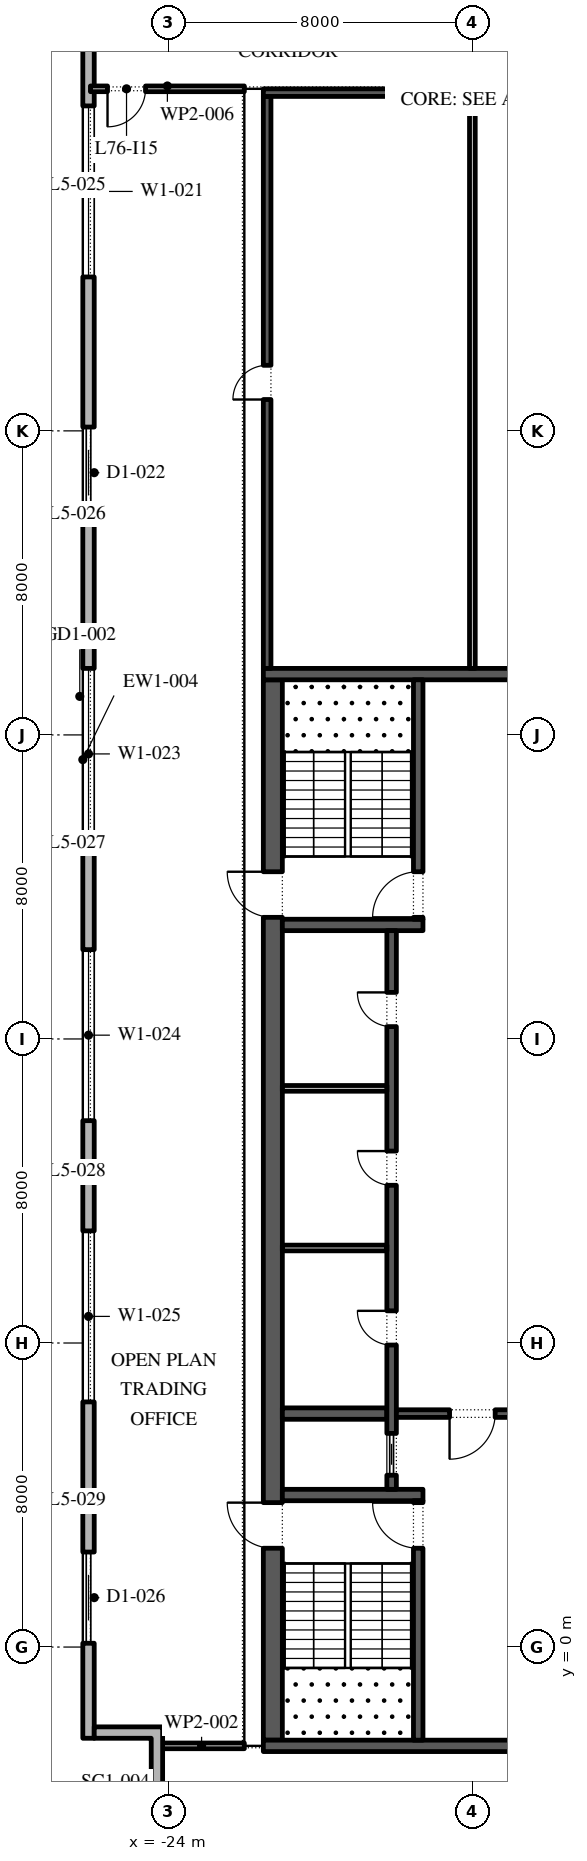
"""IFC4 building model, lengths in metres.
Left out: names, types, materials, properties, quantities, classifications, styles, units other than length and angle.
Written with IfcOpenShell. Run it as: python <this file> out.ifc"""

import sys

from ifc_helpers import new_model, si_unit, direction, frame, frame_2d, origin, place, context, subcontext, project, spatial, polyline, rectangle, outline, extrude, element, fill, save


model = new_model("IFC4")
c1 = context("Model", 3, precision=1e-05, world=origin(), true_north=direction((0.0, 1.0)))
c2 = subcontext(c1, "Body", "Model", "MODEL_VIEW")
j1 = project(units=[si_unit("LENGTHUNIT", "METRE"), si_unit("PLANEANGLEUNIT", "RADIAN")], contexts=[c1])
p1 = place(None, origin())
s1 = spatial("IfcSite", under=j1, at=p1, CompositionType="ELEMENT")
p2 = place(p1, origin())
s2 = spatial("IfcBuilding", under=s1, at=p2, CompositionType="ELEMENT")
p3 = place(p2, frame((0.0, 0.0, 346.8)))
s3 = spatial("IfcBuildingStorey", under=s2, at=p3, CompositionType="ELEMENT", Elevation=346.8)
p4 = place(p3, frame((-26.1, 49.1, 0.0), z_axis=(0.0, 0.0, 1.0), x_axis=(0.0, -1.0, 0.0)))
e1 = element("IfcWall", 1, at=p4, inside=s3, PredefinedType="STANDARD", context=c2, shape_type="SweptSolid", body=[
    extrude(rectangle(XDim=51.5, YDim=0.3, at=frame_2d((25.75, 0.0))), origin(), (0.0, 0.0, 1.0), 4.0),
])
p5 = place(p4, frame((1.3, 0.0, 0.45)))
e2 = element("IfcOpeningElement", 2, at=p5, cuts=e1, PredefinedType="OPENING", context=c2, shape_type="SweptSolid", body=[
    extrude(rectangle(XDim=4.5, YDim=3.05, at=frame_2d((2.25, 1.525))), frame((0.0, 0.16, 0.0), z_axis=(0.0, -1.0, 0.0), x_axis=(1.0, 0.0, 0.0)), (0.0, 0.0, 1.0), 0.32),
])
p6 = place(p4, frame((8.55, 0.0, 0.45)))
e3 = element("IfcOpeningElement", 3, at=p6, cuts=e1, PredefinedType="OPENING", context=c2, shape_type="SweptSolid", body=[
    extrude(rectangle(XDim=4.5, YDim=3.05, at=frame_2d((2.25, 1.525))), frame((0.0, 0.16, 0.0), z_axis=(0.0, -1.0, 0.0), x_axis=(1.0, 0.0, 0.0)), (0.0, 0.0, 1.0), 0.32),
])
p7 = place(p4, frame((17.0, 0.0, 0.0)))
e4 = element("IfcOpeningElement", 4, at=p7, cuts=e1, PredefinedType="OPENING", context=c2, shape_type="SweptSolid", body=[
    extrude(rectangle(XDim=2.4, YDim=3.5, at=frame_2d((1.2, 1.75))), frame((0.0, 0.16, 0.0), z_axis=(0.0, -1.0, 0.0), x_axis=(1.0, 0.0, 0.0)), (0.0, 0.0, 1.0), 0.32),
])
p8 = place(p4, frame((23.35, 0.0, 0.45)))
e5 = element("IfcOpeningElement", 5, at=p8, cuts=e1, PredefinedType="OPENING", context=c2, shape_type="SweptSolid", body=[
    extrude(rectangle(XDim=4.5, YDim=3.05, at=frame_2d((2.25, 1.525))), frame((0.0, 0.16, 0.0), z_axis=(0.0, -1.0, 0.0), x_axis=(1.0, 0.0, 0.0)), (0.0, 0.0, 1.0), 0.32),
])
p9 = place(p4, frame((30.75, 0.0, 0.45)))
e6 = element("IfcOpeningElement", 6, at=p9, cuts=e1, PredefinedType="OPENING", context=c2, shape_type="SweptSolid", body=[
    extrude(rectangle(XDim=4.5, YDim=3.05, at=frame_2d((2.25, 1.525))), frame((0.0, 0.16, 0.0), z_axis=(0.0, -1.0, 0.0), x_axis=(1.0, 0.0, 0.0)), (0.0, 0.0, 1.0), 0.32),
])
p10 = place(p4, frame((38.15, 0.0, 0.45)))
e7 = element("IfcOpeningElement", 7, at=p10, cuts=e1, PredefinedType="OPENING", context=c2, shape_type="SweptSolid", body=[
    extrude(rectangle(XDim=4.5, YDim=3.05, at=frame_2d((2.25, 1.525))), frame((0.0, 0.16, 0.0), z_axis=(0.0, -1.0, 0.0), x_axis=(1.0, 0.0, 0.0)), (0.0, 0.0, 1.0), 0.32),
])
p11 = place(p4, frame((46.6, 0.0, 0.0)))
e8 = element("IfcOpeningElement", 8, at=p11, cuts=e1, PredefinedType="OPENING", context=c2, shape_type="SweptSolid", body=[
    extrude(rectangle(XDim=2.4, YDim=3.5, at=frame_2d((1.2, 1.75))), frame((0.0, 0.16, 0.0), z_axis=(0.0, -1.0, 0.0), x_axis=(1.0, 0.0, 0.0)), (0.0, 0.0, 1.0), 0.32),
])
p12 = place(p3, origin())
e9 = element("IfcWall", 9, at=p12, inside=s3, PredefinedType="STANDARD", context=c2, shape_type="SweptSolid", body=[
    extrude(outline(polyline([(-22.65, -4.2), (-24.45, -4.2), (-24.45, -2.4), (-25.95, -2.4), (-25.95, -2.1), (-24.15, -2.1), (-24.15, -3.9), (-22.35, -3.9), (-22.35, -6.0), (-22.65, -6.0), (-22.65, -4.2)])), origin(), (0.0, 0.0, 1.0), 4.0),
])
p13 = place(p3, frame((-21.25, -2.45, 0.0), z_axis=(0.0, 0.0, 1.0), x_axis=(0.0, 1.0, 0.0)))
e10 = element("IfcWall", 10, at=p13, inside=s3, PredefinedType="SHEAR", context=c2, shape_type="SweptSolid", body=[
    extrude(rectangle(XDim=27.9, YDim=0.5, at=frame_2d((13.95, 0.0))), origin(), (0.0, 0.0, 1.0), 4.0),
])
p14 = place(p13, frame((5.05, 0.0, 0.0)))
e11 = element("IfcOpeningElement", 11, at=p14, cuts=e10, PredefinedType="OPENING", context=c2, shape_type="SweptSolid", body=[
    extrude(rectangle(XDim=1.2, YDim=2.1, at=frame_2d((0.6, 1.05))), frame((0.0, 0.26, 0.0), z_axis=(0.0, -1.0, 0.0), x_axis=(1.0, 0.0, 0.0)), (0.0, 0.0, 1.0), 0.52),
])
p15 = place(p13, frame((21.65, 0.0, 0.0)))
e12 = element("IfcOpeningElement", 12, at=p15, cuts=e10, PredefinedType="OPENING", context=c2, shape_type="SweptSolid", body=[
    extrude(rectangle(XDim=1.2, YDim=2.1, at=frame_2d((0.6, 1.05))), frame((0.0, 0.26, 0.0), z_axis=(0.0, -1.0, 0.0), x_axis=(1.0, 0.0, 0.0)), (0.0, 0.0, 1.0), 0.52),
])
for number, where, z_axis, x_axis in (
    (13, (-21.5, -2.6, 0.0), (0.0, 0.0, 1.0), (1.0, 0.0, 0.0)),
    (14, (-21.5, 25.6, 0.0), (0.0, 0.0, 1.0), (1.0, 0.0, 0.0)),
):
    element("IfcWall", number, at=place(p3, frame(where, z_axis=z_axis, x_axis=x_axis)), inside=s3, PredefinedType="SHEAR", context=c2, shape_type="SweptSolid", body=[
        extrude(rectangle(XDim=11.0, YDim=0.3, at=frame_2d((5.5, 0.0))), origin(), (0.0, 0.0, 1.0), 4.0),
    ])
p16 = place(p3, frame((-21.0, 4.0, 0.0), z_axis=(0.0, 0.0, 1.0), x_axis=(1.0, 0.0, 0.0)))
e15 = element("IfcWall", 15, at=p16, inside=s3, PredefinedType="SHEAR", context=c2, shape_type="SweptSolid", body=[
    extrude(rectangle(XDim=3.7, YDim=0.3, at=frame_2d((1.85, 0.0))), origin(), (0.0, 0.0, 1.0), 4.0),
])
p17 = place(p3, frame((-17.425, -2.45, 0.0), z_axis=(0.0, 0.0, 1.0), x_axis=(0.0, 1.0, 0.0)))
e16 = element("IfcWall", 16, at=p17, inside=s3, PredefinedType="SHEAR", context=c2, shape_type="SweptSolid", body=[
    extrude(rectangle(XDim=6.3, YDim=0.25, at=frame_2d((3.15, 0.0))), origin(), (0.0, 0.0, 1.0), 4.0),
])
p18 = place(p17, frame((5.05, 0.0, 0.0)))
e17 = element("IfcOpeningElement", 17, at=p18, cuts=e16, PredefinedType="OPENING", context=c2, shape_type="SweptSolid", body=[
    extrude(rectangle(XDim=1.2, YDim=2.1, at=frame_2d((0.6, 1.05))), frame((0.0, 0.135, 0.0), z_axis=(0.0, -1.0, 0.0), x_axis=(1.0, 0.0, 0.0)), (0.0, 0.0, 1.0), 0.27),
])
p19 = place(p3, frame((-21.0, 19.0, 0.0), z_axis=(0.0, 0.0, 1.0), x_axis=(1.0, 0.0, 0.0)))
e18 = element("IfcWall", 18, at=p19, inside=s3, PredefinedType="SHEAR", context=c2, shape_type="SweptSolid", body=[
    extrude(rectangle(XDim=3.7, YDim=0.3, at=frame_2d((1.85, 0.0))), origin(), (0.0, 0.0, 1.0), 4.0),
])
p20 = place(p3, frame((-17.425, 19.15, 0.0), z_axis=(0.0, 0.0, 1.0), x_axis=(0.0, 1.0, 0.0)))
e19 = element("IfcWall", 19, at=p20, inside=s3, PredefinedType="SHEAR", context=c2, shape_type="SweptSolid", body=[
    extrude(rectangle(XDim=6.3, YDim=0.25, at=frame_2d((3.15, 0.0))), origin(), (0.0, 0.0, 1.0), 4.0),
])
p21 = place(p20, frame((0.05, 0.0, 0.0)))
e20 = element("IfcOpeningElement", 20, at=p21, cuts=e19, PredefinedType="OPENING", context=c2, shape_type="SweptSolid", body=[
    extrude(rectangle(XDim=1.2, YDim=2.1, at=frame_2d((0.6, 1.05))), frame((0.0, 0.135, 0.0), z_axis=(0.0, -1.0, 0.0), x_axis=(1.0, 0.0, 0.0)), (0.0, 0.0, 1.0), 0.27),
])
p22 = place(p3, frame((-21.0, 6.143, 0.0), z_axis=(0.0, 0.0, 1.0), x_axis=(1.0, 0.0, 0.0)))
e21 = element("IfcWall", 21, at=p22, inside=s3, PredefinedType="SHEAR", context=c2, shape_type="SweptSolid", body=[
    extrude(rectangle(XDim=2.75, YDim=0.3, at=frame_2d((1.375, 0.0))), origin(), (0.0, 0.0, 1.0), 4.0),
])
p23 = place(p3, frame((-18.125, 4.15, 0.0), z_axis=(0.0, 0.0, 1.0), x_axis=(0.0, 1.0, 0.0)))
e22 = element("IfcWall", 22, at=p23, inside=s3, PredefinedType="SHEAR", context=c2, shape_type="SweptSolid", body=[
    extrude(rectangle(XDim=14.7, YDim=0.25, at=frame_2d((7.35, 0.0))), origin(), (0.0, 0.0, 1.0), 4.0),
])
p24 = place(p23, frame((3.796, 0.0, 0.0)))
e23 = element("IfcOpeningElement", 23, at=p24, cuts=e22, PredefinedType="OPENING", context=c2, shape_type="SweptSolid", body=[
    extrude(rectangle(XDim=0.9, YDim=2.1, at=frame_2d((0.45, 1.05))), frame((0.0, 0.135, 0.0), z_axis=(0.0, -1.0, 0.0), x_axis=(1.0, 0.0, 0.0)), (0.0, 0.0, 1.0), 0.27),
])
p25 = place(p23, frame((8.0, 0.0, 0.0)))
e24 = element("IfcOpeningElement", 24, at=p25, cuts=e22, PredefinedType="OPENING", context=c2, shape_type="SweptSolid", body=[
    extrude(rectangle(XDim=0.9, YDim=2.1, at=frame_2d((0.45, 1.05))), frame((0.0, 0.135, 0.0), z_axis=(0.0, -1.0, 0.0), x_axis=(1.0, 0.0, 0.0)), (0.0, 0.0, 1.0), 0.27),
])
p26 = place(p23, frame((12.175, 0.0, 0.0)))
e25 = element("IfcOpeningElement", 25, at=p26, cuts=e22, PredefinedType="OPENING", context=c2, shape_type="SweptSolid", body=[
    extrude(rectangle(XDim=0.9, YDim=2.1, at=frame_2d((0.45, 1.05))), frame((0.0, 0.135, 0.0), z_axis=(0.0, -1.0, 0.0), x_axis=(1.0, 0.0, 0.0)), (0.0, 0.0, 1.0), 0.27),
])
p27 = place(p23, frame((0.371, 0.0, 0.0)))
e26 = element("IfcOpeningElement", 26, at=p27, cuts=e22, PredefinedType="OPENING", context=c2, shape_type="SweptSolid", body=[
    extrude(rectangle(XDim=1.1, YDim=2.1, at=frame_2d((0.55, 1.05))), frame((0.0, 0.135, 0.0), z_axis=(0.0, -1.0, 0.0), x_axis=(1.0, 0.0, 0.0)), (0.0, 0.0, 1.0), 0.27),
])
for number, where, z_axis, x_axis in (
    (27, (-21.0, 10.5, 0.0), (0.0, 0.0, 1.0), (1.0, 0.0, 0.0)),
    (28, (-21.0, 14.7, 0.0), (0.0, 0.0, 1.0), (1.0, 0.0, 0.0)),
):
    element("IfcWall", number, at=place(p3, frame(where, z_axis=z_axis, x_axis=x_axis)), inside=s3, PredefinedType="PARTITIONING", context=c2, shape_type="SweptSolid", body=[
        extrude(rectangle(XDim=2.75, YDim=0.15, at=frame_2d((1.375, 0.0))), origin(), (0.0, 0.0, 1.0), 4.0),
    ])
p28 = place(p3, frame((-18.0, 6.143, 0.0), z_axis=(0.0, 0.0, 1.0), x_axis=(1.0, 0.0, 0.0)))
e29 = element("IfcWall", 29, at=p28, inside=s3, PredefinedType="SHEAR", context=c2, shape_type="SweptSolid", body=[
    extrude(rectangle(XDim=4.0, YDim=0.2, at=frame_2d((2.0, 0.0))), origin(), (0.0, 0.0, 1.0), 4.0),
])
p29 = place(p28, frame((1.4, 0.0, 0.0)))
e30 = element("IfcOpeningElement", 30, at=p29, cuts=e29, PredefinedType="OPENING", context=c2, shape_type="SweptSolid", body=[
    extrude(rectangle(XDim=1.2, YDim=2.1, at=frame_2d((0.6, 1.05))), frame((0.0, 0.11, 0.0), z_axis=(0.0, -1.0, 0.0), x_axis=(1.0, 0.0, 0.0)), (0.0, 0.0, 1.0), 0.22),
])
p30 = place(p3, frame((-21.4, 25.75, 0.0), z_axis=(0.0, 0.0, 1.0), x_axis=(0.0, 1.0, 0.0)))
e31 = element("IfcWall", 31, at=p30, inside=s3, PredefinedType="SHEAR", context=c2, shape_type="SweptSolid", body=[
    extrude(rectangle(XDim=15.05, YDim=0.2, at=frame_2d((7.525, 0.0))), origin(), (0.0, 0.0, 1.0), 4.0),
])
p31 = place(p30, frame((7.075, 0.0, 0.0)))
e32 = element("IfcOpeningElement", 32, at=p31, cuts=e31, PredefinedType="OPENING", context=c2, shape_type="SweptSolid", body=[
    extrude(rectangle(XDim=0.9, YDim=2.1, at=frame_2d((0.45, 1.05))), frame((0.0, 0.11, 0.0), z_axis=(0.0, -1.0, 0.0), x_axis=(1.0, 0.0, 0.0)), (0.0, 0.0, 1.0), 0.22),
])
p32 = place(p3, frame((-21.5, 40.9, 0.0), z_axis=(0.0, 0.0, 1.0), x_axis=(1.0, 0.0, 0.0)))
e33 = element("IfcWall", 33, at=p32, inside=s3, PredefinedType="SHEAR", context=c2, shape_type="SweptSolid", body=[
    extrude(rectangle(XDim=11.0, YDim=0.2, at=frame_2d((5.5, 0.0))), origin(), (0.0, 0.0, 1.0), 4.0),
])
p33 = place(p3, frame((-16.0, 25.75, 0.0), z_axis=(0.0, 0.0, 1.0), x_axis=(0.0, 1.0, 0.0)))
e34 = element("IfcWall", 34, at=p33, inside=s3, PredefinedType="PARTITIONING", context=c2, shape_type="SweptSolid", body=[
    extrude(rectangle(XDim=15.05, YDim=0.15, at=frame_2d((7.525, 0.0))), origin(), (0.0, 0.0, 1.0), 4.0),
])
p34 = place(p3, frame((-24.25, -2.6, 0.0), z_axis=(0.0, 0.0, 1.0), x_axis=(1.0, 0.0, 0.0)))
e35 = element("IfcWall", 35, at=p34, inside=s3, PredefinedType="PARTITIONING", context=c2, shape_type="SweptSolid", body=[
    extrude(rectangle(XDim=2.25, YDim=0.15, at=frame_2d((1.125, 0.0))), origin(), (0.0, 0.0, 1.0), 4.0),
])
p35 = place(p3, frame((-22.0, 41.0, 0.0), z_axis=(0.0, 0.0, 1.0), x_axis=(-1.0, 0.0, 0.0)))
e36 = element("IfcWall", 36, at=p35, inside=s3, PredefinedType="PARTITIONING", context=c2, shape_type="SweptSolid", body=[
    extrude(rectangle(XDim=4.05, YDim=0.15, at=frame_2d((2.025, 0.0))), origin(), (0.0, 0.0, 1.0), 4.0),
])
p36 = place(p35, frame((2.6, 0.0, 0.0)))
e37 = element("IfcOpeningElement", 37, at=p36, cuts=e36, PredefinedType="OPENING", context=c2, shape_type="SweptSolid", body=[
    extrude(rectangle(XDim=1.0, YDim=2.1, at=frame_2d((0.5, 1.05))), frame((0.0, 0.085, 0.0), z_axis=(0.0, -1.0, 0.0), x_axis=(1.0, 0.0, 0.0)), (0.0, 0.0, 1.0), 0.17),
])
p37 = place(p6, origin())
e38 = element("IfcWindow", 38, at=p37, inside=s3, PartitioningType="DOUBLE_PANEL_VERTICAL", PredefinedType="WINDOW", context=c2, shape_type="SweptSolid", body=[
    extrude(rectangle(XDim=4.5, YDim=3.05, at=frame_2d((2.25, 1.525))), frame((0.0, 0.03, 0.0), z_axis=(0.0, -1.0, 0.0), x_axis=(1.0, 0.0, 0.0)), (0.0, 0.0, 1.0), 0.06),
])
fill(e3, e38)
p38 = place(p7, origin())
e39 = element("IfcDoor", 39, at=p38, inside=s3, OperationType="DOUBLE_DOOR_SLIDING", PredefinedType="DOOR", context=c2, shape_type="SweptSolid", body=[
    extrude(rectangle(XDim=2.4, YDim=3.5, at=frame_2d((1.2, 1.75))), frame((0.0, 0.025, 0.0), z_axis=(0.0, -1.0, 0.0), x_axis=(1.0, 0.0, 0.0)), (0.0, 0.0, 1.0), 0.05),
])
fill(e4, e39)
p39 = place(p8, origin())
e40 = element("IfcWindow", 40, at=p39, inside=s3, PartitioningType="DOUBLE_PANEL_VERTICAL", PredefinedType="WINDOW", context=c2, shape_type="SweptSolid", body=[
    extrude(rectangle(XDim=4.5, YDim=3.05, at=frame_2d((2.25, 1.525))), frame((0.0, 0.03, 0.0), z_axis=(0.0, -1.0, 0.0), x_axis=(1.0, 0.0, 0.0)), (0.0, 0.0, 1.0), 0.06),
])
fill(e5, e40)
p40 = place(p9, origin())
e41 = element("IfcWindow", 41, at=p40, inside=s3, PartitioningType="DOUBLE_PANEL_VERTICAL", PredefinedType="WINDOW", context=c2, shape_type="SweptSolid", body=[
    extrude(rectangle(XDim=4.5, YDim=3.05, at=frame_2d((2.25, 1.525))), frame((0.0, 0.03, 0.0), z_axis=(0.0, -1.0, 0.0), x_axis=(1.0, 0.0, 0.0)), (0.0, 0.0, 1.0), 0.06),
])
fill(e6, e41)
p41 = place(p10, origin())
e42 = element("IfcWindow", 42, at=p41, inside=s3, PartitioningType="DOUBLE_PANEL_VERTICAL", PredefinedType="WINDOW", context=c2, shape_type="SweptSolid", body=[
    extrude(rectangle(XDim=4.5, YDim=3.05, at=frame_2d((2.25, 1.525))), frame((0.0, 0.03, 0.0), z_axis=(0.0, -1.0, 0.0), x_axis=(1.0, 0.0, 0.0)), (0.0, 0.0, 1.0), 0.06),
])
fill(e7, e42)
p42 = place(p11, origin())
e43 = element("IfcDoor", 43, at=p42, inside=s3, OperationType="DOUBLE_DOOR_SLIDING", PredefinedType="DOOR", context=c2, shape_type="SweptSolid", body=[
    extrude(rectangle(XDim=2.4, YDim=3.5, at=frame_2d((1.2, 1.75))), frame((0.0, 0.025, 0.0), z_axis=(0.0, -1.0, 0.0), x_axis=(1.0, 0.0, 0.0)), (0.0, 0.0, 1.0), 0.05),
])
fill(e8, e43)
p43 = place(p24, origin())
e44 = element("IfcDoor", 44, at=p43, inside=s3, OperationType="SINGLE_SWING_LEFT", PredefinedType="DOOR", context=c2, shape_type="SweptSolid", body=[
    extrude(rectangle(XDim=0.9, YDim=2.1, at=frame_2d((0.45, 1.05))), frame((0.0, 0.125, 0.0), z_axis=(0.0, -1.0, 0.0), x_axis=(1.0, 0.0, 0.0)), (0.0, 0.0, 1.0), 0.05),
])
fill(e23, e44)
p44 = place(p25, origin())
e45 = element("IfcDoor", 45, at=p44, inside=s3, OperationType="SINGLE_SWING_LEFT", PredefinedType="DOOR", context=c2, shape_type="SweptSolid", body=[
    extrude(rectangle(XDim=0.9, YDim=2.1, at=frame_2d((0.45, 1.05))), frame((0.0, 0.125, 0.0), z_axis=(0.0, -1.0, 0.0), x_axis=(1.0, 0.0, 0.0)), (0.0, 0.0, 1.0), 0.05),
])
fill(e24, e45)
p45 = place(p26, origin())
e46 = element("IfcDoor", 46, at=p45, inside=s3, OperationType="SINGLE_SWING_LEFT", PredefinedType="DOOR", context=c2, shape_type="SweptSolid", body=[
    extrude(rectangle(XDim=0.9, YDim=2.1, at=frame_2d((0.45, 1.05))), frame((0.0, 0.125, 0.0), z_axis=(0.0, -1.0, 0.0), x_axis=(1.0, 0.0, 0.0)), (0.0, 0.0, 1.0), 0.05),
])
fill(e25, e46)
p46 = place(p27, origin())
e47 = element("IfcDoor", 47, at=p46, inside=s3, OperationType="SLIDING_TO_LEFT", PredefinedType="DOOR", context=c2, shape_type="SweptSolid", body=[
    extrude(rectangle(XDim=1.1, YDim=2.1, at=frame_2d((0.55, 1.05))), frame((0.0, 0.025, 0.0), z_axis=(0.0, -1.0, 0.0), x_axis=(1.0, 0.0, 0.0)), (0.0, 0.0, 1.0), 0.05),
])
fill(e26, e47)
p47 = place(p29, frame((1.2, 0.0, 0.0), z_axis=(0.0, 0.0, 1.0), x_axis=(-1.0, 0.0, 0.0)))
e48 = element("IfcDoor", 48, at=p47, inside=s3, OperationType="SINGLE_SWING_LEFT", PredefinedType="DOOR", context=c2, shape_type="SweptSolid", body=[
    extrude(rectangle(XDim=1.2, YDim=2.1, at=frame_2d((0.6, 1.05))), frame((0.0, 0.025, 0.0), z_axis=(0.0, -1.0, 0.0), x_axis=(1.0, 0.0, 0.0)), (0.0, 0.0, 1.0), 0.05),
])
fill(e30, e48)
p48 = place(p18, origin())
e49 = element("IfcDoor", 49, at=p48, inside=s3, OperationType="SINGLE_SWING_LEFT", PredefinedType="DOOR", context=c2, shape_type="SweptSolid", body=[
    extrude(rectangle(XDim=1.2, YDim=2.1, at=frame_2d((0.6, 1.05))), frame((0.0, 0.025, 0.0), z_axis=(0.0, -1.0, 0.0), x_axis=(1.0, 0.0, 0.0)), (0.0, 0.0, 1.0), 0.05),
])
fill(e17, e49)
p49 = place(p14, origin())
e50 = element("IfcDoor", 50, at=p49, inside=s3, OperationType="SINGLE_SWING_LEFT", PredefinedType="DOOR", context=c2, shape_type="SweptSolid", body=[
    extrude(rectangle(XDim=1.2, YDim=2.1, at=frame_2d((0.6, 1.05))), frame((0.0, 0.025, 0.0), z_axis=(0.0, -1.0, 0.0), x_axis=(1.0, 0.0, 0.0)), (0.0, 0.0, 1.0), 0.05),
])
fill(e11, e50)
p50 = place(p21, origin())
e51 = element("IfcDoor", 51, at=p50, inside=s3, OperationType="SINGLE_SWING_RIGHT", PredefinedType="DOOR", context=c2, shape_type="SweptSolid", body=[
    extrude(rectangle(XDim=1.2, YDim=2.1, at=frame_2d((0.6, 1.05))), frame((0.0, 0.025, 0.0), z_axis=(0.0, -1.0, 0.0), x_axis=(1.0, 0.0, 0.0)), (0.0, 0.0, 1.0), 0.05),
])
fill(e20, e51)
p51 = place(p15, origin())
e52 = element("IfcDoor", 52, at=p51, inside=s3, OperationType="SINGLE_SWING_LEFT", PredefinedType="DOOR", context=c2, shape_type="SweptSolid", body=[
    extrude(rectangle(XDim=1.2, YDim=2.1, at=frame_2d((0.6, 1.05))), frame((0.0, 0.025, 0.0), z_axis=(0.0, -1.0, 0.0), x_axis=(1.0, 0.0, 0.0)), (0.0, 0.0, 1.0), 0.05),
])
fill(e12, e52)
p52 = place(p31, origin())
e53 = element("IfcDoor", 53, at=p52, inside=s3, OperationType="SINGLE_SWING_RIGHT", PredefinedType="DOOR", context=c2, shape_type="SweptSolid", body=[
    extrude(rectangle(XDim=0.9, YDim=2.1, at=frame_2d((0.45, 1.05))), frame((0.0, -0.05, 0.0), z_axis=(0.0, -1.0, 0.0), x_axis=(1.0, 0.0, 0.0)), (0.0, 0.0, 1.0), 0.05),
])
fill(e32, e53)
p53 = place(p36, origin())
e54 = element("IfcDoor", 54, at=p53, inside=s3, OperationType="SINGLE_SWING_LEFT", PredefinedType="DOOR", context=c2, shape_type="SweptSolid", body=[
    extrude(rectangle(XDim=1.0, YDim=2.1, at=frame_2d((0.5, 1.05))), frame((0.0, 0.025, 0.0), z_axis=(0.0, -1.0, 0.0), x_axis=(1.0, 0.0, 0.0)), (0.0, 0.0, 1.0), 0.05),
])
fill(e37, e54)
save(model, sys.argv[1])
